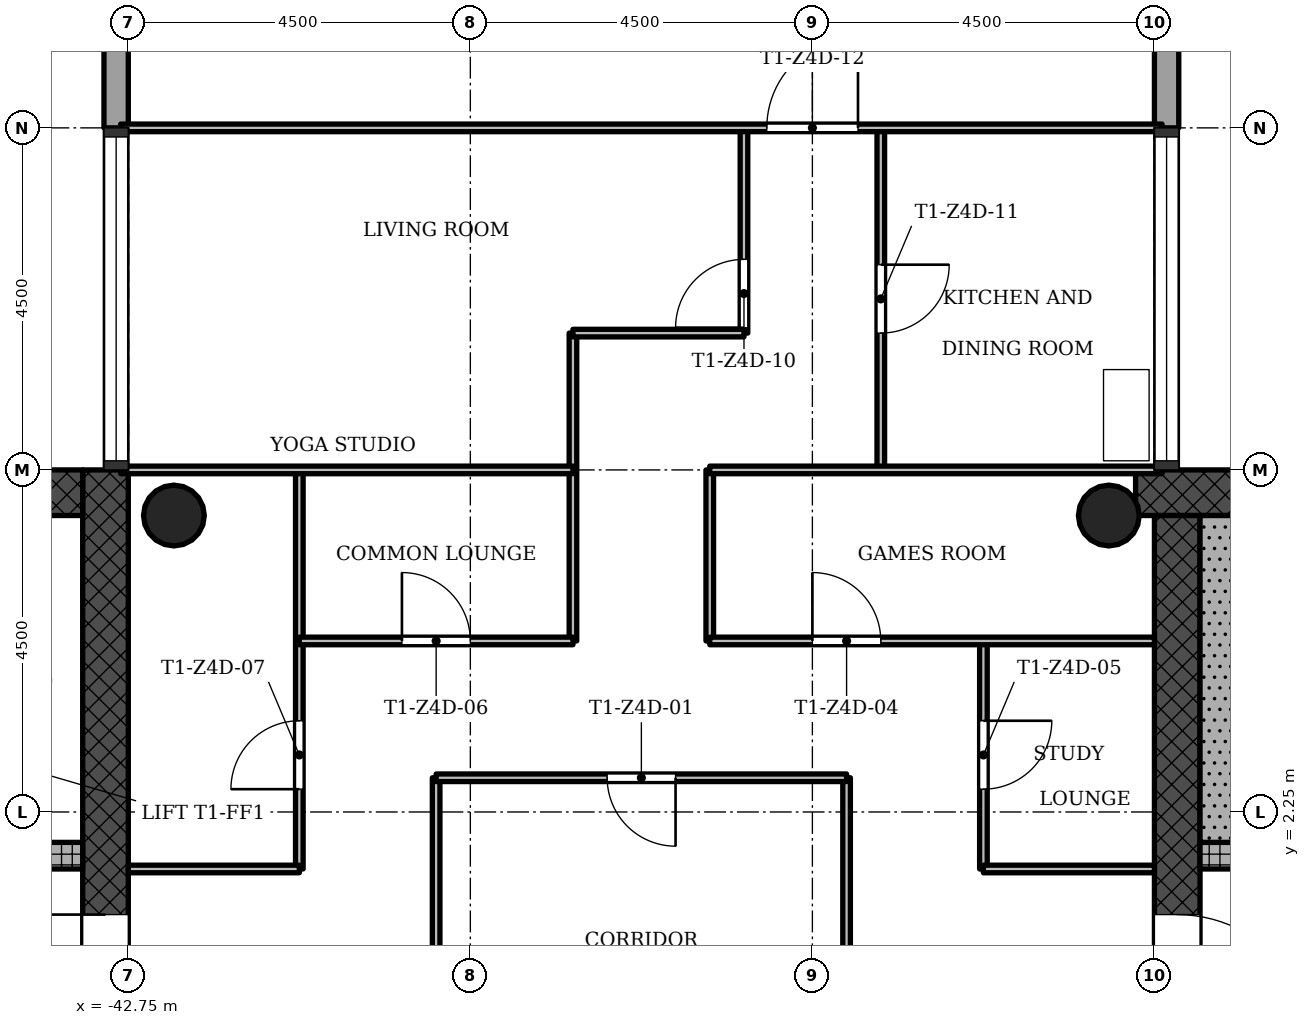
"""IFC4 building model, lengths in metres.
Left out: names, types, materials, properties, quantities, classifications, styles, units other than length and angle.
Written with IfcOpenShell. Run it as: python <this file> out.ifc"""

import sys

from ifc_helpers import new_model, si_unit, direction, frame, frame_2d, origin, origin_2d, place, context, subcontext, project, spatial, rectangle, hollow_circle, extrude, element, fill, save


model = new_model("IFC4")
c1 = context("Model", 3, precision=1e-05, world=origin(), true_north=direction((0.0, 1.0)))
c2 = subcontext(c1, "Body", "Model", "MODEL_VIEW")
j1 = project(units=[si_unit("LENGTHUNIT", "METRE"), si_unit("PLANEANGLEUNIT", "RADIAN")], contexts=[c1])
p1 = place(None, origin())
s1 = spatial("IfcSite", under=j1, at=p1, CompositionType="ELEMENT")
p2 = place(p1, origin())
s2 = spatial("IfcBuilding", under=s1, at=p2, CompositionType="ELEMENT")
p3 = place(p2, frame((0.0, 0.0, 199.4)))
s3 = spatial("IfcBuildingStorey", under=s2, at=p3, CompositionType="ELEMENT", Elevation=199.4)
p4 = place(p3, frame((-20.602, 6.45, 0.0), z_axis=(0.0, 0.0, 1.0), x_axis=(-1.0, 0.0, 0.0)))
e1 = element("IfcWall", 1, at=p4, inside=s3, PredefinedType="SHEAR", context=c2, shape_type="SweptSolid", body=[
    extrude(rectangle(XDim=8.896, YDim=0.6, at=frame_2d((4.448, 0.0))), origin(), (0.0, 0.0, 1.0), 3.4),
])
p5 = place(p3, frame((-28.95, 6.15, 0.0), z_axis=(0.0, 0.0, 1.0), x_axis=(0.0, -1.0, 0.0)))
e2 = element("IfcWall", 2, at=p5, inside=s3, PredefinedType="SHEAR", context=c2, shape_type="SweptSolid", body=[
    extrude(rectangle(XDim=12.9, YDim=0.6, at=frame_2d((6.45, 0.0))), origin(), (0.0, 0.0, 1.0), 3.4),
])
p6 = place(p5, frame((5.25, 0.0, 0.0)))
e3 = element("IfcOpeningElement", 3, at=p6, cuts=e2, PredefinedType="OPENING", context=c2, shape_type="SweptSolid", body=[
    extrude(rectangle(XDim=1.8, YDim=2.1, at=frame_2d((0.9, 1.05))), frame((0.0, 0.31, 0.0), z_axis=(0.0, -1.0, 0.0), x_axis=(1.0, 0.0, 0.0)), (0.0, 0.0, 1.0), 0.62),
])
p7 = place(p3, frame((-28.65, 1.675, 0.0), z_axis=(0.0, 0.0, 1.0), x_axis=(1.0, 0.0, 0.0)))
e4 = element("IfcWall", 4, at=p7, inside=s3, PredefinedType="SHEAR", context=c2, shape_type="SweptSolid", body=[
    extrude(rectangle(XDim=7.8, YDim=0.35, at=frame_2d((3.9, 0.0))), origin(), (0.0, 0.0, 1.0), 3.4),
])
p8 = place(p7, frame((1.05, 0.0, 0.0)))
e5 = element("IfcOpeningElement", 5, at=p8, cuts=e4, PredefinedType="OPENING", context=c2, shape_type="SweptSolid", body=[
    extrude(rectangle(XDim=0.9, YDim=2.1, at=frame_2d((0.45, 1.05))), frame((0.0, 0.185, 0.0), z_axis=(0.0, -1.0, 0.0), x_axis=(1.0, 0.0, 0.0)), (0.0, 0.0, 1.0), 0.37),
])
p9 = place(p3, frame((-43.05, -6.15, 0.0), z_axis=(0.0, 0.0, 1.0), x_axis=(0.0, 1.0, 0.0)))
e6 = element("IfcWall", 6, at=p9, inside=s3, PredefinedType="SHEAR", context=c2, shape_type="SweptSolid", body=[
    extrude(rectangle(XDim=12.9, YDim=0.6, at=frame_2d((6.45, 0.0))), origin(), (0.0, 0.0, 1.0), 3.4),
])
p10 = place(p9, frame((5.25, 0.0, 0.0)))
e7 = element("IfcOpeningElement", 7, at=p10, cuts=e6, PredefinedType="OPENING", context=c2, shape_type="SweptSolid", body=[
    extrude(rectangle(XDim=1.8, YDim=2.1, at=frame_2d((0.9, 1.05))), frame((0.0, 0.31, 0.0), z_axis=(0.0, -1.0, 0.0), x_axis=(1.0, 0.0, 0.0)), (0.0, 0.0, 1.0), 0.62),
])
p11 = place(p3, frame((-43.35, 6.45, 0.0), z_axis=(0.0, 0.0, 1.0), x_axis=(-1.0, 0.0, 0.0)))
e8 = element("IfcWall", 8, at=p11, inside=s3, PredefinedType="SHEAR", context=c2, shape_type="SweptSolid", body=[
    extrude(rectangle(XDim=8.4, YDim=0.6, at=frame_2d((4.2, 0.0))), origin(), (0.0, 0.0, 1.0), 3.4),
])
p12 = place(p3, frame((-51.15, 1.675, 0.0), z_axis=(0.0, 0.0, 1.0), x_axis=(1.0, 0.0, 0.0)))
e9 = element("IfcWall", 9, at=p12, inside=s3, PredefinedType="SHEAR", context=c2, shape_type="SweptSolid", body=[
    extrude(rectangle(XDim=7.8, YDim=0.35, at=frame_2d((3.9, 0.0))), origin(), (0.0, 0.0, 1.0), 3.4),
])
p13 = place(p12, frame((5.55, 0.0, 0.0)))
e10 = element("IfcOpeningElement", 10, at=p13, cuts=e9, PredefinedType="OPENING", context=c2, shape_type="SweptSolid", body=[
    extrude(rectangle(XDim=1.1, YDim=2.1, at=frame_2d((0.55, 1.05))), frame((0.0, 0.185, 0.0), z_axis=(0.0, -1.0, 0.0), x_axis=(1.0, 0.0, 0.0)), (0.0, 0.0, 1.0), 0.37),
])
p14 = place(p12, frame((1.2, 0.0, 0.0)))
e11 = element("IfcOpeningElement", 11, at=p14, cuts=e9, PredefinedType="OPENING", context=c2, shape_type="SweptSolid", body=[
    extrude(rectangle(XDim=1.1, YDim=2.1, at=frame_2d((0.55, 1.05))), frame((0.0, 0.185, 0.0), z_axis=(0.0, -1.0, 0.0), x_axis=(1.0, 0.0, 0.0)), (0.0, 0.0, 1.0), 0.37),
])
p15 = place(p12, frame((3.5, 0.0, 0.0)))
e12 = element("IfcOpeningElement", 12, at=p15, cuts=e9, PredefinedType="OPENING", context=c2, shape_type="SweptSolid", body=[
    extrude(rectangle(XDim=0.9, YDim=2.1, at=frame_2d((0.45, 1.05))), frame((0.0, 0.185, 0.0), z_axis=(0.0, -1.0, 0.0), x_axis=(1.0, 0.0, 0.0)), (0.0, 0.0, 1.0), 0.37),
])
for number, where, z_axis, x_axis in (
    (13, (-29.85, 6.15, 0.0), (0.0, 0.0, 1.0), (1.0, 0.0, 0.0)),
    (14, (-42.15, 6.15, 0.0), (0.0, 0.0, 1.0), (1.0, 0.0, 0.0)),
):
    element("IfcColumn", number, at=place(p3, frame(where, z_axis=z_axis, x_axis=x_axis)), inside=s3, PredefinedType="COLUMN", context=c2, shape_type="SweptSolid", body=[
        extrude(hollow_circle(Radius=0.4, WallThickness=0.028, at=origin_2d()), origin(), (0.0, 0.0, 1.0), 3.4),
    ])
p16 = place(p3, frame((-29.09, 11.25, -0.3), z_axis=(0.0, 0.0, 1.0), x_axis=(0.0, 1.0, 0.0)))
e15 = element("IfcWall", 15, at=p16, inside=s3, PredefinedType="STANDARD", context=c2, shape_type="SweptSolid", body=[
    extrude(rectangle(XDim=1.82, YDim=0.32, at=frame_2d((0.91, 0.0))), origin(), (0.0, 0.0, 1.0), 3.4),
])
p17 = place(p3, frame((-42.91, 12.75, -0.3), z_axis=(0.0, 0.0, 1.0), x_axis=(0.0, -1.0, 0.0)))
e16 = element("IfcWall", 16, at=p17, inside=s3, PredefinedType="STANDARD", context=c2, shape_type="SweptSolid", body=[
    extrude(rectangle(XDim=1.5, YDim=0.32, at=frame_2d((0.75, 0.0))), origin(), (0.0, 0.0, 1.0), 3.4),
])
p18 = place(p3, frame((-40.5, 1.5, 0.0), z_axis=(0.0, 0.0, 1.0), x_axis=(0.0, 1.0, 0.0)))
e17 = element("IfcWall", 17, at=p18, inside=s3, PredefinedType="PARTITIONING", context=c2, shape_type="SweptSolid", body=[
    extrude(rectangle(XDim=5.25, YDim=0.1, at=frame_2d((2.625, 0.0))), origin(), (0.0, 0.0, 1.0), 3.0),
])
p19 = place(p18, frame((1.05, 0.0, 0.0)))
e18 = element("IfcOpeningElement", 18, at=p19, cuts=e17, PredefinedType="OPENING", context=c2, shape_type="SweptSolid", body=[
    extrude(rectangle(XDim=0.9, YDim=2.1, at=frame_2d((0.45, 1.05))), frame((0.0, 0.06, 0.0), z_axis=(0.0, -1.0, 0.0), x_axis=(1.0, 0.0, 0.0)), (0.0, 0.0, 1.0), 0.12),
])
p20 = place(p3, frame((-38.7, -2.7, 0.0), z_axis=(0.0, 0.0, 1.0), x_axis=(0.0, 1.0, 0.0)))
e19 = element("IfcWall", 19, at=p20, inside=s3, PredefinedType="PARTITIONING", context=c2, shape_type="SweptSolid", body=[
    extrude(rectangle(XDim=5.4, YDim=0.1, at=frame_2d((2.7, 0.0))), origin(), (0.0, 0.0, 1.0), 3.0),
])
p21 = place(p3, frame((-36.9, 4.5, 0.0), z_axis=(0.0, 0.0, 1.0), x_axis=(0.0, 1.0, 0.0)))
e20 = element("IfcWall", 20, at=p21, inside=s3, PredefinedType="PARTITIONING", context=c2, shape_type="SweptSolid", body=[
    extrude(rectangle(XDim=4.05, YDim=0.1, at=frame_2d((2.025, 0.0))), origin(), (0.0, 0.0, 1.0), 3.0),
])
p22 = place(p3, frame((-35.1, 4.5, 0.0), z_axis=(0.0, 0.0, 1.0), x_axis=(0.0, 1.0, 0.0)))
e21 = element("IfcWall", 21, at=p22, inside=s3, PredefinedType="PARTITIONING", context=c2, shape_type="SweptSolid", body=[
    extrude(rectangle(XDim=2.25, YDim=0.1, at=frame_2d((1.125, 0.0))), origin(), (0.0, 0.0, 1.0), 3.0),
])
p23 = place(p3, frame((-34.65, 8.55, 0.0), z_axis=(0.0, 0.0, 1.0), x_axis=(0.0, 1.0, 0.0)))
e22 = element("IfcWall", 22, at=p23, inside=s3, PredefinedType="PARTITIONING", context=c2, shape_type="SweptSolid", body=[
    extrude(rectangle(XDim=2.7, YDim=0.1, at=frame_2d((1.35, 0.0))), origin(), (0.0, 0.0, 1.0), 3.0),
])
p24 = place(p23, frame((0.07, 0.0, 0.0)))
e23 = element("IfcOpeningElement", 23, at=p24, cuts=e22, PredefinedType="OPENING", context=c2, shape_type="SweptSolid", body=[
    extrude(rectangle(XDim=0.9, YDim=2.1, at=frame_2d((0.45, 1.05))), frame((0.0, 0.06, 0.0), z_axis=(0.0, -1.0, 0.0), x_axis=(1.0, 0.0, 0.0)), (0.0, 0.0, 1.0), 0.12),
])
p25 = place(p3, frame((-33.3, -2.7, 0.0), z_axis=(0.0, 0.0, 1.0), x_axis=(0.0, 1.0, 0.0)))
e24 = element("IfcWall", 24, at=p25, inside=s3, PredefinedType="PARTITIONING", context=c2, shape_type="SweptSolid", body=[
    extrude(rectangle(XDim=5.4, YDim=0.1, at=frame_2d((2.7, 0.0))), origin(), (0.0, 0.0, 1.0), 3.0),
])
p26 = place(p25, frame((2.25, 0.0, 0.0)))
e25 = element("IfcOpeningElement", 25, at=p26, cuts=e24, PredefinedType="OPENING", context=c2, shape_type="SweptSolid", body=[
    extrude(rectangle(XDim=0.9, YDim=2.1, at=frame_2d((0.45, 1.05))), frame((0.0, 0.06, 0.0), z_axis=(0.0, -1.0, 0.0), x_axis=(1.0, 0.0, 0.0)), (0.0, 0.0, 1.0), 0.12),
])
p27 = place(p3, frame((-32.85, 6.75, 0.0), z_axis=(0.0, 0.0, 1.0), x_axis=(0.0, 1.0, 0.0)))
e26 = element("IfcWall", 26, at=p27, inside=s3, PredefinedType="PARTITIONING", context=c2, shape_type="SweptSolid", body=[
    extrude(rectangle(XDim=4.5, YDim=0.1, at=frame_2d((2.25, 0.0))), origin(), (0.0, 0.0, 1.0), 3.0),
])
p28 = place(p27, frame((1.8, 0.0, 0.0)))
e27 = element("IfcOpeningElement", 27, at=p28, cuts=e26, PredefinedType="OPENING", context=c2, shape_type="SweptSolid", body=[
    extrude(rectangle(XDim=0.9, YDim=2.1, at=frame_2d((0.45, 1.05))), frame((0.0, 0.06, 0.0), z_axis=(0.0, -1.0, 0.0), x_axis=(1.0, 0.0, 0.0)), (0.0, 0.0, 1.0), 0.12),
])
p29 = place(p3, frame((-31.5, 1.5, 0.0), z_axis=(0.0, 0.0, 1.0), x_axis=(0.0, 1.0, 0.0)))
e28 = element("IfcWall", 28, at=p29, inside=s3, PredefinedType="PARTITIONING", context=c2, shape_type="SweptSolid", body=[
    extrude(rectangle(XDim=3.0, YDim=0.1, at=frame_2d((1.5, 0.0))), origin(), (0.0, 0.0, 1.0), 3.0),
])
p30 = place(p29, frame((1.05, 0.0, 0.0)))
e29 = element("IfcOpeningElement", 29, at=p30, cuts=e28, PredefinedType="OPENING", context=c2, shape_type="SweptSolid", body=[
    extrude(rectangle(XDim=0.9, YDim=2.1, at=frame_2d((0.45, 1.05))), frame((0.0, 0.06, 0.0), z_axis=(0.0, -1.0, 0.0), x_axis=(1.0, 0.0, 0.0)), (0.0, 0.0, 1.0), 0.12),
])
for number, where, z_axis, x_axis in (
    (30, (-42.75, 1.5, 0.0), (0.0, 0.0, 1.0), (1.0, 0.0, 0.0)),
    (31, (-31.5, 1.5, 0.0), (0.0, 0.0, 1.0), (1.0, 0.0, 0.0)),
):
    element("IfcWall", number, at=place(p3, frame(where, z_axis=z_axis, x_axis=x_axis)), inside=s3, PredefinedType="PARTITIONING", context=c2, shape_type="SweptSolid", body=[
        extrude(rectangle(XDim=2.25, YDim=0.1, at=frame_2d((1.125, 0.0))), origin(), (0.0, 0.0, 1.0), 3.0),
    ])
p31 = place(p3, frame((-38.7, 2.7, 0.0), z_axis=(0.0, 0.0, 1.0), x_axis=(1.0, 0.0, 0.0)))
e32 = element("IfcWall", 32, at=p31, inside=s3, PredefinedType="PARTITIONING", context=c2, shape_type="SweptSolid", body=[
    extrude(rectangle(XDim=5.4, YDim=0.1, at=frame_2d((2.7, 0.0))), origin(), (0.0, 0.0, 1.0), 3.0),
])
p32 = place(p31, frame((2.25, 0.0, 0.0)))
e33 = element("IfcOpeningElement", 33, at=p32, cuts=e32, PredefinedType="OPENING", context=c2, shape_type="SweptSolid", body=[
    extrude(rectangle(XDim=0.9, YDim=2.1, at=frame_2d((0.45, 1.05))), frame((0.0, 0.06, 0.0), z_axis=(0.0, -1.0, 0.0), x_axis=(1.0, 0.0, 0.0)), (0.0, 0.0, 1.0), 0.12),
])
p33 = place(p3, frame((-40.5, 4.5, 0.0), z_axis=(0.0, 0.0, 1.0), x_axis=(1.0, 0.0, 0.0)))
e34 = element("IfcWall", 34, at=p33, inside=s3, PredefinedType="PARTITIONING", context=c2, shape_type="SweptSolid", body=[
    extrude(rectangle(XDim=3.6, YDim=0.1, at=frame_2d((1.8, 0.0))), origin(), (0.0, 0.0, 1.0), 3.0),
])
p34 = place(p33, frame((1.35, 0.0, 0.0)))
e35 = element("IfcOpeningElement", 35, at=p34, cuts=e34, PredefinedType="OPENING", context=c2, shape_type="SweptSolid", body=[
    extrude(rectangle(XDim=0.9, YDim=2.1, at=frame_2d((0.45, 1.05))), frame((0.0, 0.06, 0.0), z_axis=(0.0, -1.0, 0.0), x_axis=(1.0, 0.0, 0.0)), (0.0, 0.0, 1.0), 0.12),
])
p35 = place(p3, frame((-35.1, 4.5, 0.0), z_axis=(0.0, 0.0, 1.0), x_axis=(1.0, 0.0, 0.0)))
e36 = element("IfcWall", 36, at=p35, inside=s3, PredefinedType="PARTITIONING", context=c2, shape_type="SweptSolid", body=[
    extrude(rectangle(XDim=5.85, YDim=0.1, at=frame_2d((2.925, 0.0))), origin(), (0.0, 0.0, 1.0), 3.0),
])
p36 = place(p35, frame((1.35, 0.0, 0.0)))
e37 = element("IfcOpeningElement", 37, at=p36, cuts=e36, PredefinedType="OPENING", context=c2, shape_type="SweptSolid", body=[
    extrude(rectangle(XDim=0.9, YDim=2.1, at=frame_2d((0.45, 1.05))), frame((0.0, 0.06, 0.0), z_axis=(0.0, -1.0, 0.0), x_axis=(1.0, 0.0, 0.0)), (0.0, 0.0, 1.0), 0.12),
])
for number, where, z_axis, x_axis in (
    (38, (-42.85, 6.75, 0.0), (0.0, 0.0, 1.0), (1.0, 0.0, 0.0)),
    (39, (-35.1, 6.75, 0.0), (0.0, 0.0, 1.0), (1.0, 0.0, 0.0)),
):
    element("IfcWall", number, at=place(p3, frame(where, z_axis=z_axis, x_axis=x_axis)), inside=s3, PredefinedType="PARTITIONING", context=c2, shape_type="SweptSolid", body=[
        extrude(rectangle(XDim=5.95, YDim=0.1, at=frame_2d((2.975, 0.0))), origin(), (0.0, 0.0, 1.0), 3.0),
    ])
p37 = place(p3, frame((-36.9, 8.55, 0.0), z_axis=(0.0, 0.0, 1.0), x_axis=(1.0, 0.0, 0.0)))
e40 = element("IfcWall", 40, at=p37, inside=s3, PredefinedType="PARTITIONING", context=c2, shape_type="SweptSolid", body=[
    extrude(rectangle(XDim=2.25, YDim=0.1, at=frame_2d((1.125, 0.0))), origin(), (0.0, 0.0, 1.0), 3.0),
])
p38 = place(p3, frame((-42.85, 11.25, 0.0), z_axis=(0.0, 0.0, 1.0), x_axis=(1.0, 0.0, 0.0)))
e41 = element("IfcWall", 41, at=p38, inside=s3, PredefinedType="PARTITIONING", context=c2, shape_type="SweptSolid", body=[
    extrude(rectangle(XDim=13.7, YDim=0.1, at=frame_2d((6.85, 0.0))), origin(), (0.0, 0.0, 1.0), 3.0),
])
p39 = place(p38, frame((8.5, 0.0, 0.0)))
e42 = element("IfcOpeningElement", 42, at=p39, cuts=e41, PredefinedType="OPENING", context=c2, shape_type="SweptSolid", body=[
    extrude(rectangle(XDim=1.2, YDim=2.1, at=frame_2d((0.6, 1.05))), frame((0.0, 0.06, 0.0), z_axis=(0.0, -1.0, 0.0), x_axis=(1.0, 0.0, 0.0)), (0.0, 0.0, 1.0), 0.12),
])
p40 = place(p3, frame((-28.35, 1.85, 0.0), z_axis=(0.0, 0.0, 1.0), x_axis=(0.0, 1.0, 0.0)))
e43 = element("IfcWall", 43, at=p40, inside=s3, PredefinedType="SHEAR", context=c2, shape_type="SweptSolid", body=[
    extrude(rectangle(XDim=4.3, YDim=0.6, at=frame_2d((2.15, 0.0))), origin(), (0.0, 0.0, 1.0), 3.4),
])
p41 = place(p32, origin())
e44 = element("IfcDoor", 44, at=p41, inside=s3, OperationType="SINGLE_SWING_RIGHT", PredefinedType="DOOR", context=c2, shape_type="SweptSolid", body=[
    extrude(rectangle(XDim=0.9, YDim=2.1, at=frame_2d((0.45, 1.05))), frame((0.0, 0.025, 0.0), z_axis=(0.0, -1.0, 0.0), x_axis=(1.0, 0.0, 0.0)), (0.0, 0.0, 1.0), 0.05),
])
fill(e33, e44)
p42 = place(p36, origin())
e45 = element("IfcDoor", 45, at=p42, inside=s3, OperationType="SINGLE_SWING_RIGHT", PredefinedType="DOOR", context=c2, shape_type="SweptSolid", body=[
    extrude(rectangle(XDim=0.9, YDim=2.1, at=frame_2d((0.45, 1.05))), frame((0.0, 0.025, 0.0), z_axis=(0.0, -1.0, 0.0), x_axis=(1.0, 0.0, 0.0)), (0.0, 0.0, 1.0), 0.05),
])
fill(e37, e45)
p43 = place(p30, origin())
e46 = element("IfcDoor", 46, at=p43, inside=s3, OperationType="SINGLE_SWING_RIGHT", PredefinedType="DOOR", context=c2, shape_type="SweptSolid", body=[
    extrude(rectangle(XDim=0.9, YDim=2.1, at=frame_2d((0.45, 1.05))), frame((0.0, 0.025, 0.0), z_axis=(0.0, -1.0, 0.0), x_axis=(1.0, 0.0, 0.0)), (0.0, 0.0, 1.0), 0.05),
])
fill(e29, e46)
p44 = place(p34, origin())
e47 = element("IfcDoor", 47, at=p44, inside=s3, OperationType="SINGLE_SWING_RIGHT", PredefinedType="DOOR", context=c2, shape_type="SweptSolid", body=[
    extrude(rectangle(XDim=0.9, YDim=2.1, at=frame_2d((0.45, 1.05))), frame((0.0, 0.025, 0.0), z_axis=(0.0, -1.0, 0.0), x_axis=(1.0, 0.0, 0.0)), (0.0, 0.0, 1.0), 0.05),
])
fill(e35, e47)
p45 = place(p19, origin())
e48 = element("IfcDoor", 48, at=p45, inside=s3, OperationType="SINGLE_SWING_RIGHT", PredefinedType="DOOR", context=c2, shape_type="SweptSolid", body=[
    extrude(rectangle(XDim=0.9, YDim=2.1, at=frame_2d((0.45, 1.05))), frame((0.0, 0.025, 0.0), z_axis=(0.0, -1.0, 0.0), x_axis=(1.0, 0.0, 0.0)), (0.0, 0.0, 1.0), 0.05),
])
fill(e18, e48)
p46 = place(p24, origin())
e49 = element("IfcDoor", 49, at=p46, inside=s3, OperationType="SINGLE_SWING_RIGHT", PredefinedType="DOOR", context=c2, shape_type="SweptSolid", body=[
    extrude(rectangle(XDim=0.9, YDim=2.1, at=frame_2d((0.45, 1.05))), frame((0.0, 0.025, 0.0), z_axis=(0.0, -1.0, 0.0), x_axis=(1.0, 0.0, 0.0)), (0.0, 0.0, 1.0), 0.05),
])
fill(e23, e49)
p47 = place(p28, origin())
e50 = element("IfcDoor", 50, at=p47, inside=s3, OperationType="SINGLE_SWING_RIGHT", PredefinedType="DOOR", context=c2, shape_type="SweptSolid", body=[
    extrude(rectangle(XDim=0.9, YDim=2.1, at=frame_2d((0.45, 1.05))), frame((0.0, 0.025, 0.0), z_axis=(0.0, -1.0, 0.0), x_axis=(1.0, 0.0, 0.0)), (0.0, 0.0, 1.0), 0.05),
])
fill(e27, e50)
p48 = place(p39, origin())
e51 = element("IfcDoor", 51, at=p48, inside=s3, OperationType="SINGLE_SWING_LEFT", PredefinedType="DOOR", context=c2, shape_type="SweptSolid", body=[
    extrude(rectangle(XDim=1.2, YDim=2.1, at=frame_2d((0.6, 1.05))), frame((0.0, 0.025, 0.0), z_axis=(0.0, -1.0, 0.0), x_axis=(1.0, 0.0, 0.0)), (0.0, 0.0, 1.0), 0.05),
])
fill(e42, e51)
p49 = place(p6, origin())
e52 = element("IfcDoor", 52, at=p49, inside=s3, OperationType="SINGLE_SWING_LEFT", PredefinedType="DOOR", context=c2, shape_type="SweptSolid", body=[
    extrude(rectangle(XDim=1.8, YDim=2.1, at=frame_2d((0.9, 1.05))), frame((0.0, 0.025, 0.0), z_axis=(0.0, -1.0, 0.0), x_axis=(1.0, 0.0, 0.0)), (0.0, 0.0, 1.0), 0.05),
])
fill(e3, e52)
p50 = place(p10, origin())
e53 = element("IfcDoor", 53, at=p50, inside=s3, OperationType="SINGLE_SWING_LEFT", PredefinedType="DOOR", context=c2, shape_type="SweptSolid", body=[
    extrude(rectangle(XDim=1.8, YDim=2.1, at=frame_2d((0.9, 1.05))), frame((0.0, 0.025, 0.0), z_axis=(0.0, -1.0, 0.0), x_axis=(1.0, 0.0, 0.0)), (0.0, 0.0, 1.0), 0.05),
])
fill(e7, e53)
save(model, sys.argv[1])
